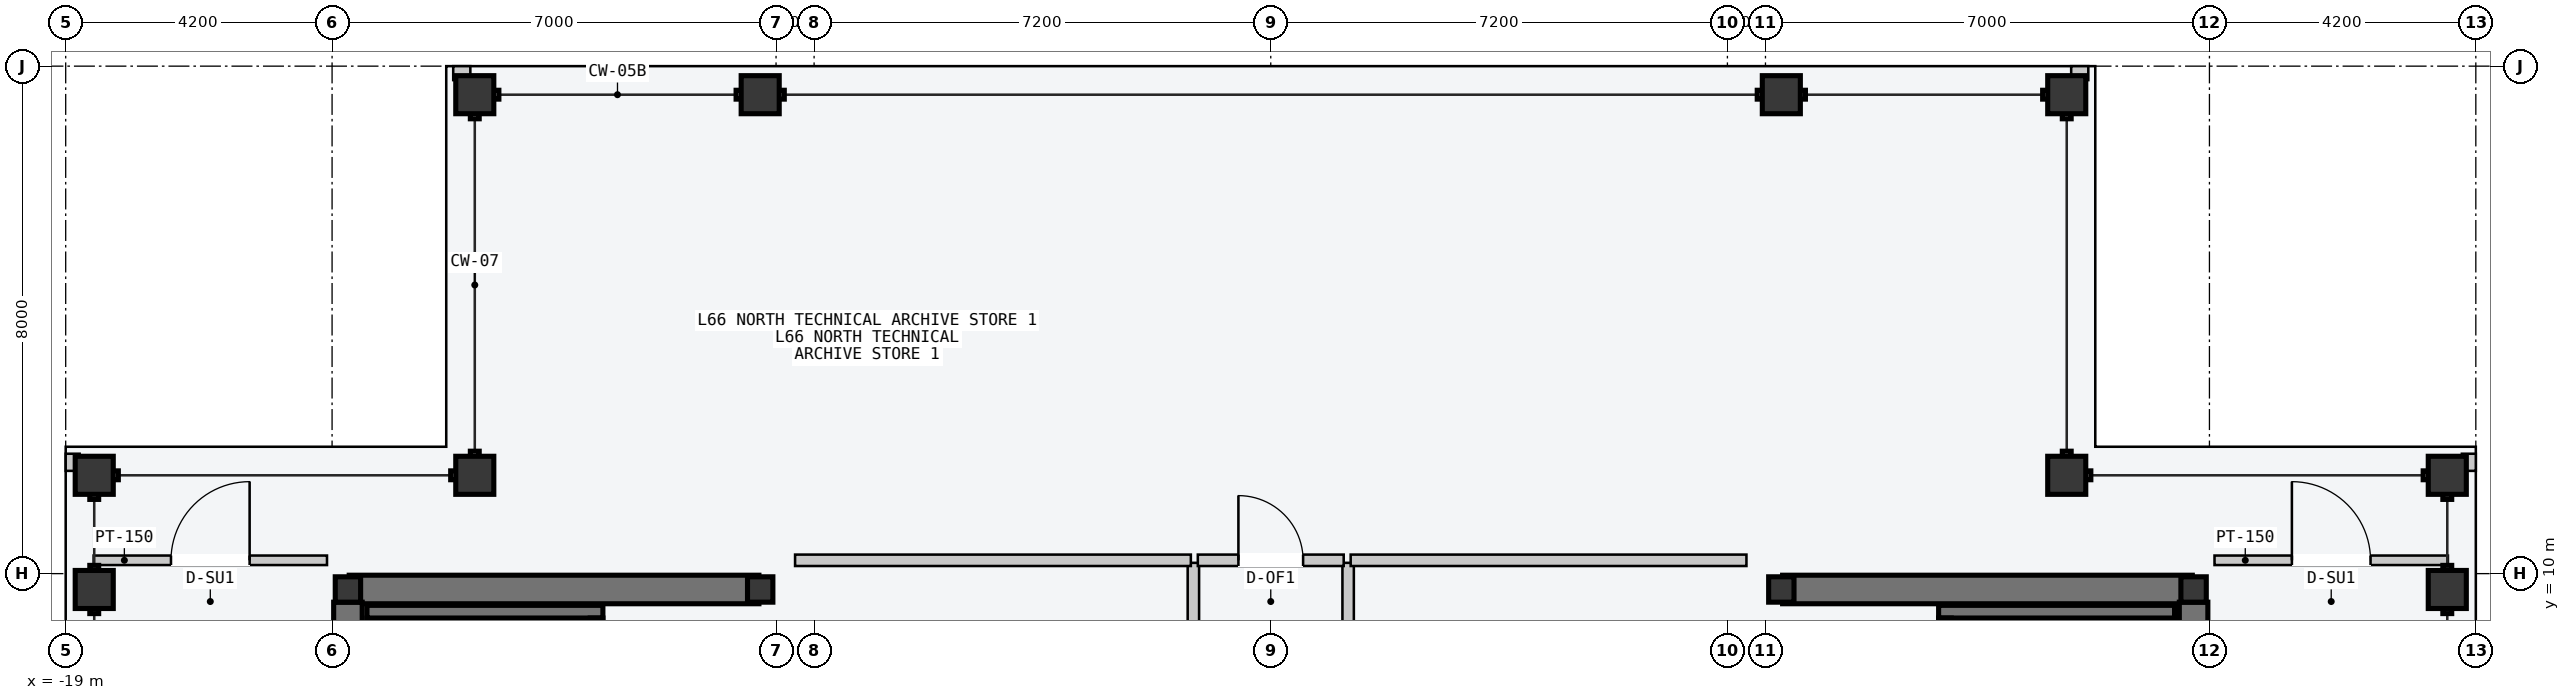
"""IFC4 building model, lengths in metres.
Left out: names, types, materials, properties, quantities, classifications, styles, units other than length and angle.
Written with IfcOpenShell. Run it as: python <this file> out.ifc"""

import sys

from ifc_helpers import new_model, si_unit, direction, frame, frame_2d, origin, origin_2d, place, context, subcontext, project, spatial, rectangle, hollow_rectangle, i_section, extrude, element, fill, save


model = new_model("IFC4")
c1 = context("Model", 3, precision=1e-05, world=origin(), true_north=direction((0.0, 1.0)))
c2 = subcontext(c1, "Body", "Model", "MODEL_VIEW")
j1 = project(units=[si_unit("LENGTHUNIT", "METRE"), si_unit("PLANEANGLEUNIT", "RADIAN")], contexts=[c1])
p1 = place(None, origin())
s1 = spatial("IfcSite", under=j1, at=p1, CompositionType="ELEMENT")
p2 = place(p1, origin())
s2 = spatial("IfcBuilding", under=s1, at=p2, CompositionType="ELEMENT")
p3 = place(p2, frame((0.0, 0.0, 250.8)))
s3 = spatial("IfcBuildingStorey", under=s2, at=p3, CompositionType="ELEMENT", Elevation=250.8)
p4 = place(p3, frame((-14.53, 9.75, -0.2), z_axis=(0.0, 0.0, 1.0), x_axis=(1.0, 0.0, 0.0)))
e1 = element("IfcWall", 1, at=p4, inside=s3, PredefinedType="SHEAR", context=c2, shape_type="SweptSolid", body=[
    extrude(rectangle(XDim=6.46, YDim=0.45, at=frame_2d((3.23, 0.0))), origin(), (0.0, 0.0, 1.0), 3.6),
])
p5 = place(p3, frame((-14.55, 0.2, -0.2), z_axis=(0.0, 0.0, 1.0), x_axis=(0.0, 1.0, 0.0)))
e2 = element("IfcWall", 2, at=p5, inside=s3, PredefinedType="SHEAR", context=c2, shape_type="SweptSolid", body=[
    extrude(rectangle(XDim=9.35, YDim=0.45, at=frame_2d((4.675, 0.0))), origin(), (0.0, 0.0, 1.0), 3.6),
])
p6 = place(p3, frame((8.07, 9.75, -0.2), z_axis=(0.0, 0.0, 1.0), x_axis=(1.0, 0.0, 0.0)))
e3 = element("IfcWall", 3, at=p6, inside=s3, PredefinedType="SHEAR", context=c2, shape_type="SweptSolid", body=[
    extrude(rectangle(XDim=6.46, YDim=0.45, at=frame_2d((3.23, 0.0))), origin(), (0.0, 0.0, 1.0), 3.6),
])
p7 = place(p3, frame((14.55, 0.2, -0.2), z_axis=(0.0, 0.0, 1.0), x_axis=(0.0, 1.0, 0.0)))
e4 = element("IfcWall", 4, at=p7, inside=s3, PredefinedType="SHEAR", context=c2, shape_type="SweptSolid", body=[
    extrude(rectangle(XDim=9.35, YDim=0.45, at=frame_2d((4.675, 0.0))), origin(), (0.0, 0.0, 1.0), 3.6),
])
for number, where, z_axis, x_axis in (
    (5, (-14.15, 1.5, -0.2), (0.0, 0.0, 1.0), (0.0, 1.0, 0.0)),
    (6, (14.15, 1.5, -0.2), (0.0, 0.0, 1.0), (0.0, 1.0, 0.0)),
):
    element("IfcWall", number, at=place(p3, frame(where, z_axis=z_axis, x_axis=x_axis)), inside=s3, PredefinedType="SOLIDWALL", context=c2, shape_type="SweptSolid", body=[
        extrude(rectangle(XDim=7.8, YDim=0.2, at=frame_2d((3.9, 0.0))), origin(), (0.0, 0.0, 1.0), 3.6),
    ])
p8 = place(p3, frame((-14.25, 9.4, -0.2), z_axis=(0.0, 0.0, 1.0), x_axis=(1.0, 0.0, 0.0)))
e7 = element("IfcWall", 7, at=p8, inside=s3, PredefinedType="SOLIDWALL", context=c2, shape_type="SweptSolid", body=[
    extrude(rectangle(XDim=3.72, YDim=0.2, at=frame_2d((1.86, 0.0))), origin(), (0.0, 0.0, 1.0), 3.6),
])
p9 = place(p3, frame((-10.63, 1.5, -0.2), z_axis=(0.0, 0.0, 1.0), x_axis=(0.0, 1.0, 0.0)))
e8 = element("IfcWall", 8, at=p9, inside=s3, PredefinedType="SOLIDWALL", context=c2, shape_type="SweptSolid", body=[
    extrude(rectangle(XDim=7.8, YDim=0.2, at=frame_2d((3.9, 0.0))), origin(), (0.0, 0.0, 1.0), 3.6),
])
p10 = place(p3, frame((10.53, 9.4, -0.2), z_axis=(0.0, 0.0, 1.0), x_axis=(1.0, 0.0, 0.0)))
e9 = element("IfcWall", 9, at=p10, inside=s3, PredefinedType="SOLIDWALL", context=c2, shape_type="SweptSolid", body=[
    extrude(rectangle(XDim=3.72, YDim=0.2, at=frame_2d((1.86, 0.0))), origin(), (0.0, 0.0, 1.0), 3.6),
])
p11 = place(p3, frame((10.63, 1.5, -0.2), z_axis=(0.0, 0.0, 1.0), x_axis=(0.0, 1.0, 0.0)))
e10 = element("IfcWall", 10, at=p11, inside=s3, PredefinedType="SOLIDWALL", context=c2, shape_type="SweptSolid", body=[
    extrude(rectangle(XDim=7.8, YDim=0.2, at=frame_2d((3.9, 0.0))), origin(), (0.0, 0.0, 1.0), 3.6),
])
for number, where, z_axis, x_axis in (
    (11, (-14.55, 9.75, 0.0), (0.0, 0.0, 1.0), (1.0, 0.0, 0.0)),
    (12, (-8.05, 9.75, 0.0), (0.0, 0.0, 1.0), (1.0, 0.0, 0.0)),
    (13, (8.05, 9.75, 0.0), (0.0, 0.0, 1.0), (1.0, 0.0, 0.0)),
    (14, (14.55, 9.75, 0.0), (0.0, 0.0, 1.0), (1.0, 0.0, 0.0)),
):
    element("IfcColumn", number, at=place(p3, frame(where, z_axis=z_axis, x_axis=x_axis)), inside=s3, PredefinedType="COLUMN", context=c2, shape_type="SweptSolid", body=[
        extrude(i_section(OverallWidth=0.4, OverallDepth=0.4, WebThickness=0.013, FlangeThickness=0.021, at=origin_2d()), origin(), (0.0, 0.0, 1.0), 3.6),
    ])
for number, where, z_axis, x_axis in (
    (15, (-12.55, 17.55, 0.0), (0.0, 0.0, 1.0), (1.0, 0.0, 0.0)),
    (16, (-8.05, 17.55, 0.0), (0.0, 0.0, 1.0), (1.0, 0.0, 0.0)),
    (17, (8.05, 17.55, 0.0), (0.0, 0.0, 1.0), (1.0, 0.0, 0.0)),
    (18, (12.55, 17.55, 0.0), (0.0, 0.0, 1.0), (1.0, 0.0, 0.0)),
    (19, (-18.55, 9.75, 0.0), (0.0, 0.0, 1.0), (0.0, 1.0, 0.0)),
    (20, (-18.55, 11.55, 0.0), (0.0, 0.0, 1.0), (0.0, 1.0, 0.0)),
    (21, (18.55, 9.75, 0.0), (0.0, 0.0, 1.0), (0.0, 1.0, 0.0)),
    (22, (18.55, 11.55, 0.0), (0.0, 0.0, 1.0), (0.0, 1.0, 0.0)),
    (23, (-12.55, 11.55, 0.0), (0.0, 0.0, 1.0), (1.0, 0.0, 0.0)),
    (24, (12.55, 11.55, 0.0), (0.0, 0.0, 1.0), (1.0, 0.0, 0.0)),
):
    element("IfcColumn", number, at=place(p3, frame(where, z_axis=z_axis, x_axis=x_axis)), inside=s3, PredefinedType="COLUMN", context=c2, shape_type="SweptSolid", body=[
        extrude(hollow_rectangle(XDim=0.6, YDim=0.6, WallThickness=0.025, at=origin_2d()), origin(), (0.0, 0.0, 1.0), 3.6),
    ])
for number, where, z_axis, x_axis in (
    (25, (-12.89, 17.89, 0.0), (0.0, 0.0, 1.0), (1.0, 0.0, 0.0)),
    (26, (-18.89, 11.62, 0.0), (0.0, 0.0, 1.0), (0.0, 1.0, 0.0)),
    (27, (12.62, 17.89, 0.0), (0.0, 0.0, 1.0), (1.0, 0.0, 0.0)),
    (28, (18.89, 11.62, 0.0), (0.0, 0.0, 1.0), (0.0, 1.0, 0.0)),
):
    element("IfcWall", number, at=place(p3, frame(where, z_axis=z_axis, x_axis=x_axis)), inside=s3, PredefinedType="PARAPET", context=c2, shape_type="SweptSolid", body=[
        extrude(rectangle(XDim=0.27, YDim=0.22, at=frame_2d((0.135, 0.0))), origin(), (0.0, 0.0, 1.0), 1.2),
    ])
p12 = place(p3, frame((-1.22, -3.5, 0.0), z_axis=(0.0, 0.0, 1.0), x_axis=(0.0, 1.0, 0.0)))
e29 = element("IfcWall", 29, at=p12, inside=s3, PredefinedType="PARTITIONING", context=c2, shape_type="SweptSolid", body=[
    extrude(rectangle(XDim=13.67, YDim=0.18, at=frame_2d((6.835, 0.0))), origin(), (0.0, 0.0, 1.0), 3.4),
])
p13 = place(p12, frame((6.1, 0.0, 0.0)))
e30 = element("IfcOpeningElement", 30, at=p13, cuts=e29, PredefinedType="OPENING", context=c2, shape_type="SweptSolid", body=[
    extrude(rectangle(XDim=1.24, YDim=2.24, at=frame_2d((0.62, 1.12))), frame((0.0, 0.1, 0.0), z_axis=(0.0, -1.0, 0.0), x_axis=(1.0, 0.0, 0.0)), (0.0, 0.0, 1.0), 0.2),
])
p14 = place(p12, frame((1.6, 0.0, 0.0)))
e31 = element("IfcOpeningElement", 31, at=p14, cuts=e29, PredefinedType="OPENING", context=c2, shape_type="SweptSolid", body=[
    extrude(rectangle(XDim=0.96, YDim=2.18, at=frame_2d((0.48, 1.09))), frame((0.0, 0.1, 0.0), z_axis=(0.0, -1.0, 0.0), x_axis=(1.0, 0.0, 0.0)), (0.0, 0.0, 1.0), 0.2),
])
p15 = place(p3, frame((-7.5, 10.21, 0.0), z_axis=(0.0, 0.0, 1.0), x_axis=(1.0, 0.0, 0.0)))
e32 = element("IfcWall", 32, at=p15, inside=s3, PredefinedType="PARTITIONING", context=c2, shape_type="SweptSolid", body=[
    extrude(rectangle(XDim=6.24, YDim=0.18, at=frame_2d((3.12, 0.0))), origin(), (0.0, 0.0, 1.0), 3.4),
])
p16 = place(p3, frame((1.22, -3.5, 0.0), z_axis=(0.0, 0.0, 1.0), x_axis=(0.0, 1.0, 0.0)))
e33 = element("IfcWall", 33, at=p16, inside=s3, PredefinedType="PARTITIONING", context=c2, shape_type="SweptSolid", body=[
    extrude(rectangle(XDim=13.67, YDim=0.18, at=frame_2d((6.835, 0.0))), origin(), (0.0, 0.0, 1.0), 3.4),
])
p17 = place(p16, frame((6.1, 0.0, 0.0)))
e34 = element("IfcOpeningElement", 34, at=p17, cuts=e33, PredefinedType="OPENING", context=c2, shape_type="SweptSolid", body=[
    extrude(rectangle(XDim=1.24, YDim=2.24, at=frame_2d((0.62, 1.12))), frame((0.0, 0.1, 0.0), z_axis=(0.0, -1.0, 0.0), x_axis=(1.0, 0.0, 0.0)), (0.0, 0.0, 1.0), 0.2),
])
p18 = place(p16, frame((1.6, 0.0, 0.0)))
e35 = element("IfcOpeningElement", 35, at=p18, cuts=e33, PredefinedType="OPENING", context=c2, shape_type="SweptSolid", body=[
    extrude(rectangle(XDim=0.96, YDim=2.18, at=frame_2d((0.48, 1.09))), frame((0.0, 0.1, 0.0), z_axis=(0.0, -1.0, 0.0), x_axis=(1.0, 0.0, 0.0)), (0.0, 0.0, 1.0), 0.2),
])
p19 = place(p3, frame((1.26, 10.21, 0.0), z_axis=(0.0, 0.0, 1.0), x_axis=(1.0, 0.0, 0.0)))
e36 = element("IfcWall", 36, at=p19, inside=s3, PredefinedType="PARTITIONING", context=c2, shape_type="SweptSolid", body=[
    extrude(rectangle(XDim=6.24, YDim=0.18, at=frame_2d((3.12, 0.0))), origin(), (0.0, 0.0, 1.0), 3.4),
])
p20 = place(p3, frame((-1.15, 10.21, 0.0), z_axis=(0.0, 0.0, 1.0), x_axis=(1.0, 0.0, 0.0)))
e37 = element("IfcWall", 37, at=p20, inside=s3, PredefinedType="PARTITIONING", context=c2, shape_type="SweptSolid", body=[
    extrude(rectangle(XDim=2.3, YDim=0.18, at=frame_2d((1.15, 0.0))), origin(), (0.0, 0.0, 1.0), 3.4),
])
p21 = place(p20, frame((0.64, 0.0, 0.0)))
e38 = element("IfcOpeningElement", 38, at=p21, cuts=e37, PredefinedType="OPENING", context=c2, shape_type="SweptSolid", body=[
    extrude(rectangle(XDim=1.02, YDim=2.2, at=frame_2d((0.51, 1.1))), frame((0.0, 0.1, 0.0), z_axis=(0.0, -1.0, 0.0), x_axis=(1.0, 0.0, 0.0)), (0.0, 0.0, 1.0), 0.2),
])
p22 = place(p3, frame((-18.56, 10.21, 0.0), z_axis=(0.0, 0.0, 1.0), x_axis=(1.0, 0.0, 0.0)))
e39 = element("IfcWall", 39, at=p22, inside=s3, PredefinedType="PARTITIONING", context=c2, shape_type="SweptSolid", body=[
    extrude(rectangle(XDim=3.68, YDim=0.15, at=frame_2d((1.84, 0.0))), origin(), (0.0, 0.0, 1.0), 3.4),
])
p23 = place(p22, frame((1.22, 0.0, 0.0)))
e40 = element("IfcOpeningElement", 40, at=p23, cuts=e39, PredefinedType="OPENING", context=c2, shape_type="SweptSolid", body=[
    extrude(rectangle(XDim=1.24, YDim=2.24, at=frame_2d((0.62, 1.12))), frame((0.0, 0.085, 0.0), z_axis=(0.0, -1.0, 0.0), x_axis=(1.0, 0.0, 0.0)), (0.0, 0.0, 1.0), 0.17),
])
p24 = place(p3, frame((14.88, 10.21, 0.0), z_axis=(0.0, 0.0, 1.0), x_axis=(1.0, 0.0, 0.0)))
e41 = element("IfcWall", 41, at=p24, inside=s3, PredefinedType="PARTITIONING", context=c2, shape_type="SweptSolid", body=[
    extrude(rectangle(XDim=3.68, YDim=0.15, at=frame_2d((1.84, 0.0))), origin(), (0.0, 0.0, 1.0), 3.4),
])
p25 = place(p24, frame((1.22, 0.0, 0.0)))
e42 = element("IfcOpeningElement", 42, at=p25, cuts=e41, PredefinedType="OPENING", context=c2, shape_type="SweptSolid", body=[
    extrude(rectangle(XDim=1.24, YDim=2.24, at=frame_2d((0.62, 1.12))), frame((0.0, 0.085, 0.0), z_axis=(0.0, -1.0, 0.0), x_axis=(1.0, 0.0, 0.0)), (0.0, 0.0, 1.0), 0.17),
])
p26 = place(p21, origin())
e43 = element("IfcDoor", 43, at=p26, inside=s3, OperationType="SINGLE_SWING_LEFT", PredefinedType="DOOR", context=c2, shape_type="SweptSolid", body=[
    extrude(rectangle(XDim=1.02, YDim=2.2, at=frame_2d((0.51, 1.1))), frame((0.0, 0.025, 0.0), z_axis=(0.0, -1.0, 0.0), x_axis=(1.0, 0.0, 0.0)), (0.0, 0.0, 1.0), 0.05),
])
fill(e38, e43)
p27 = place(p23, origin())
e44 = element("IfcDoor", 44, at=p27, inside=s3, OperationType="SINGLE_SWING_RIGHT", PredefinedType="DOOR", context=c2, shape_type="SweptSolid", body=[
    extrude(rectangle(XDim=1.24, YDim=2.24, at=frame_2d((0.62, 1.12))), frame((0.0, 0.025, 0.0), z_axis=(0.0, -1.0, 0.0), x_axis=(1.0, 0.0, 0.0)), (0.0, 0.0, 1.0), 0.05),
])
fill(e40, e44)
p28 = place(p25, origin())
e45 = element("IfcDoor", 45, at=p28, inside=s3, OperationType="SINGLE_SWING_LEFT", PredefinedType="DOOR", context=c2, shape_type="SweptSolid", body=[
    extrude(rectangle(XDim=1.24, YDim=2.24, at=frame_2d((0.62, 1.12))), frame((0.0, 0.025, 0.0), z_axis=(0.0, -1.0, 0.0), x_axis=(1.0, 0.0, 0.0)), (0.0, 0.0, 1.0), 0.05),
])
fill(e42, e45)
save(model, sys.argv[1])
